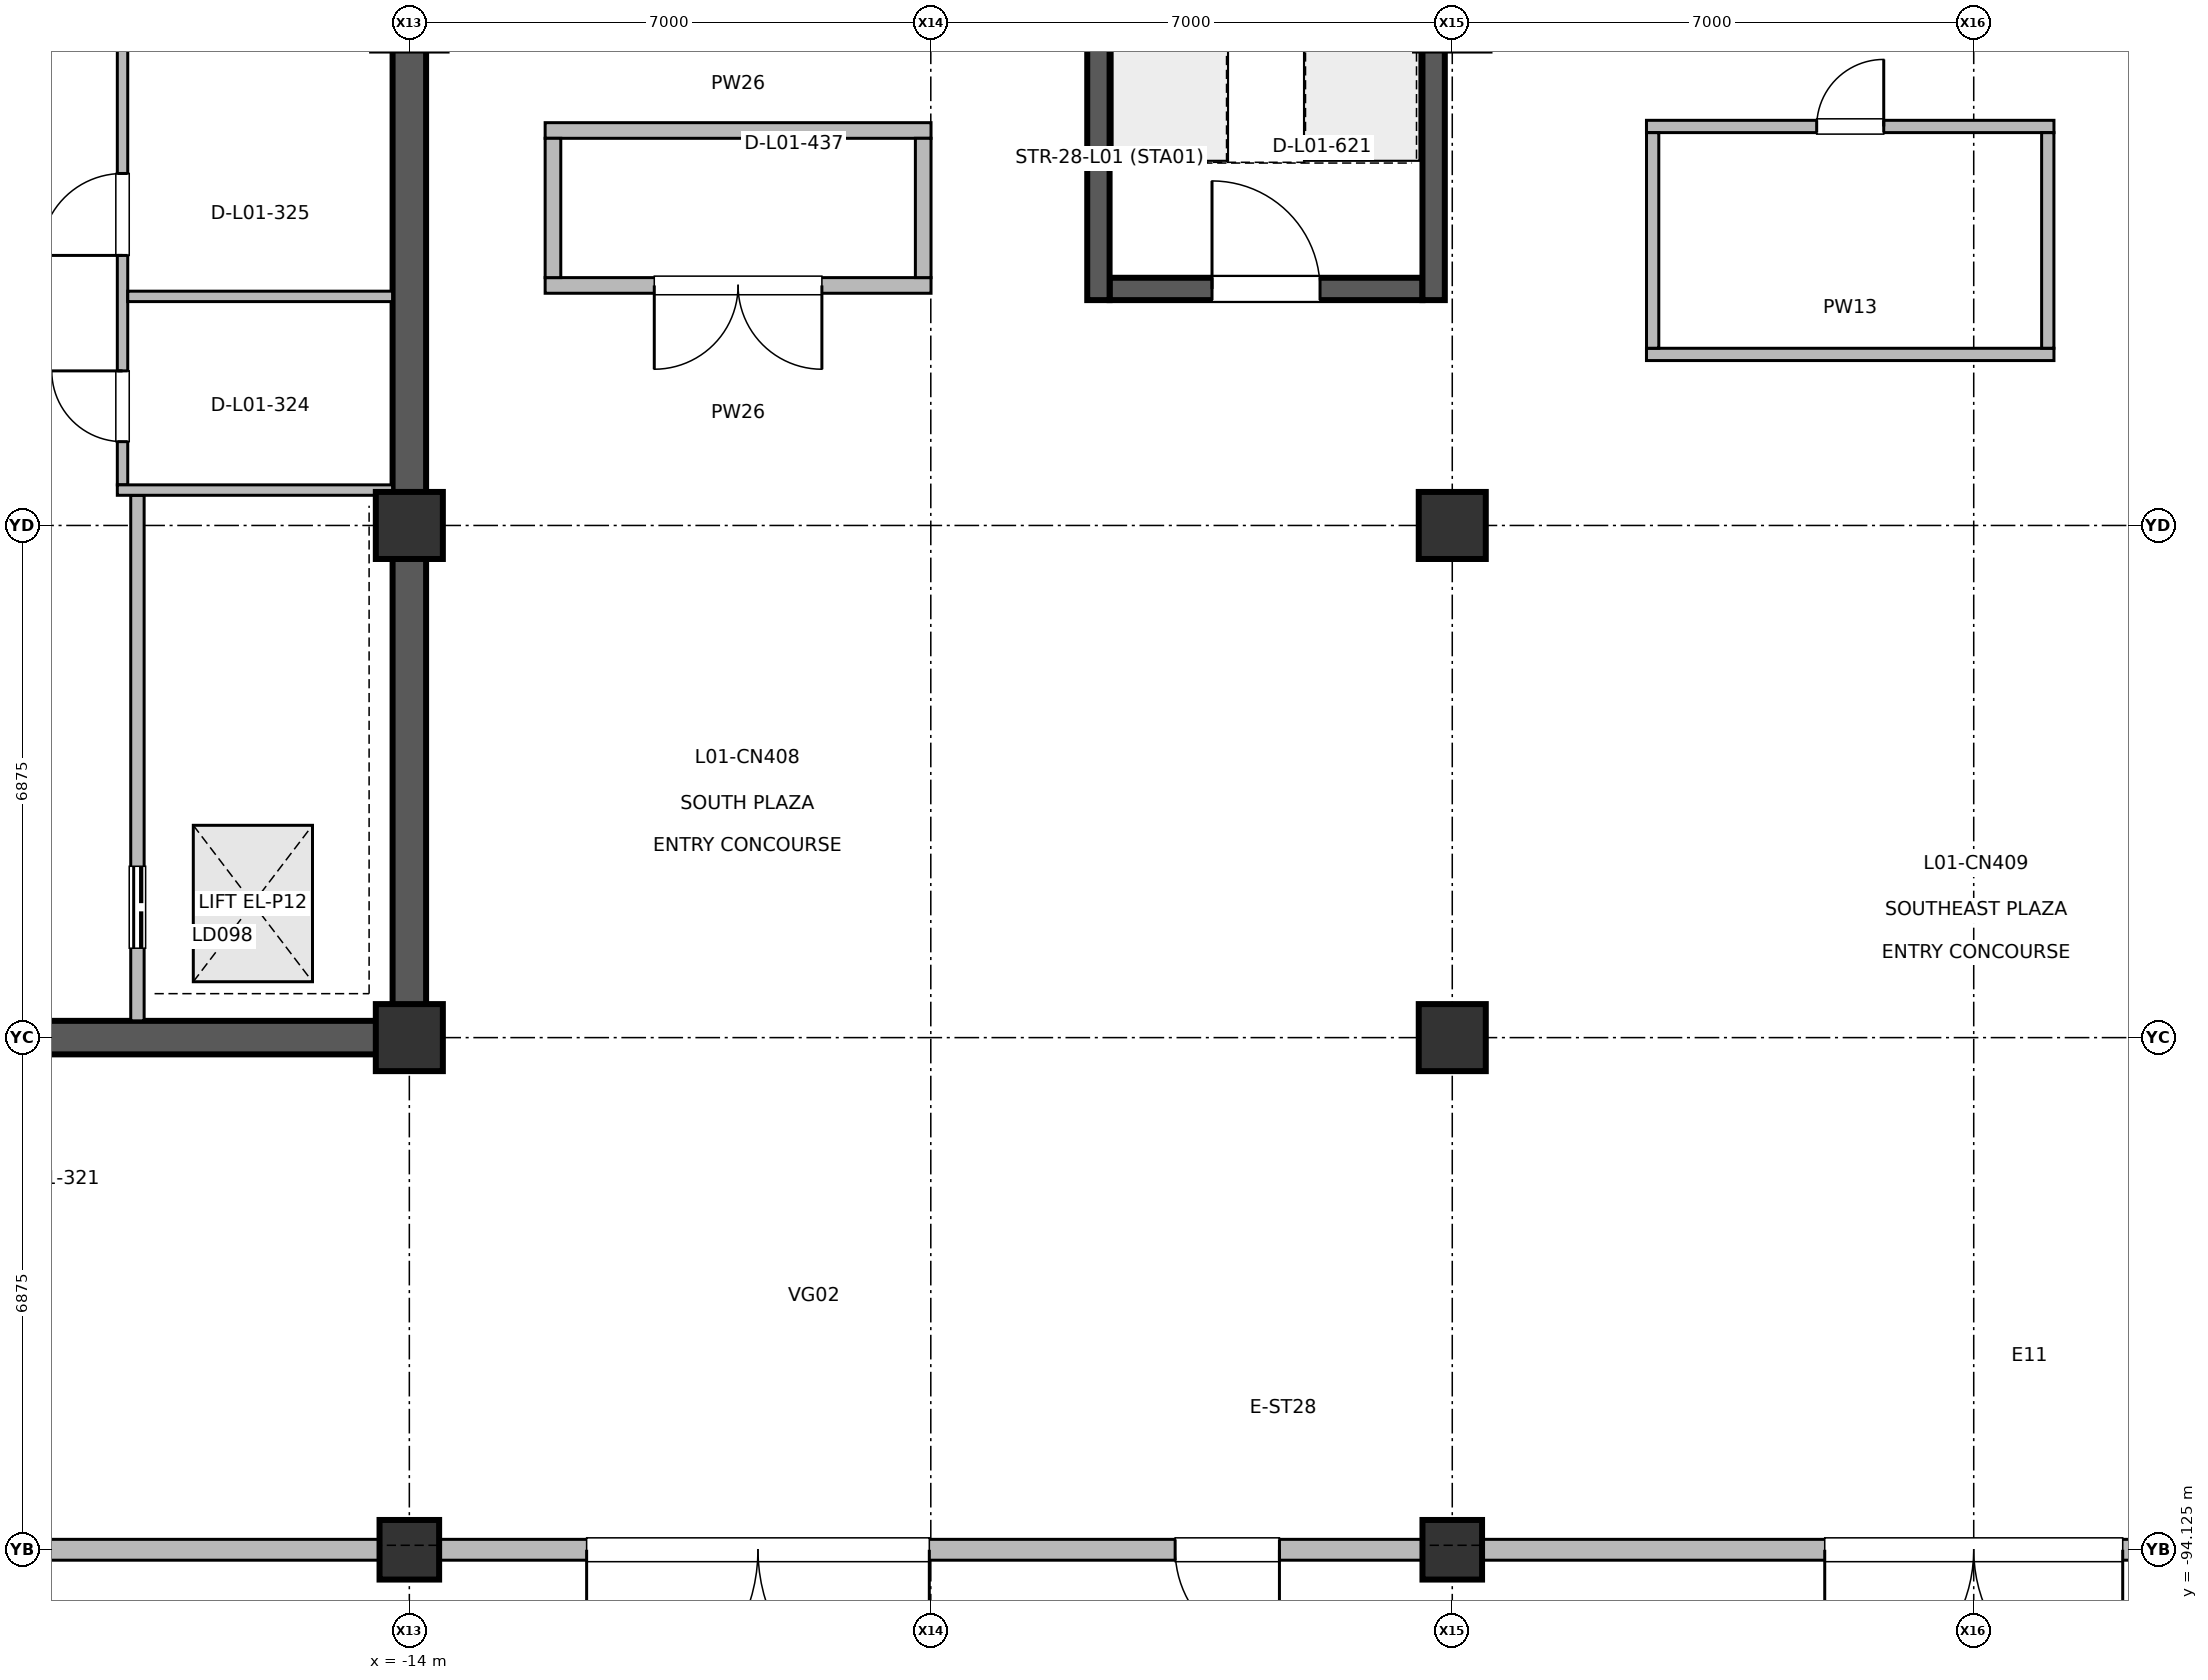
"""IFC4 building model, lengths in metres.
Left out: names, types, materials, properties, quantities, classifications, styles, units other than length and angle.
Written with IfcOpenShell. Run it as: python <this file> out.ifc"""

import sys

from ifc_helpers import new_model, si_unit, direction, frame, frame_2d, origin, origin_2d, place, context, subcontext, project, spatial, rectangle, circle, extrude, element, fill, save


model = new_model("IFC4")
c1 = context("Model", 3, precision=1e-05, world=origin(), true_north=direction((0.0, 1.0)))
c2 = subcontext(c1, "Body", "Model", "MODEL_VIEW")
j1 = project(units=[si_unit("LENGTHUNIT", "METRE"), si_unit("PLANEANGLEUNIT", "RADIAN")], contexts=[c1])
p1 = place(None, origin())
s1 = spatial("IfcSite", under=j1, at=p1, CompositionType="ELEMENT")
p2 = place(p1, origin())
s2 = spatial("IfcBuilding", under=s1, at=p2, CompositionType="ELEMENT")
p3 = place(p2, origin())
s3 = spatial("IfcBuildingStorey", under=s2, at=p3, CompositionType="ELEMENT", Elevation=0.0)
p4 = place(p3, frame((-14.0, -94.125, 0.0), z_axis=(0.0, 0.0, 1.0), x_axis=(1.0, 0.0, 0.0)))
e1 = element("IfcColumn", 1, at=p4, inside=s3, PredefinedType="COLUMN", context=c2, shape_type="SweptSolid", body=[
    extrude(circle(Radius=0.4, at=origin_2d()), origin(), (0.0, 0.0, 1.0), 5.998),
])
for number, where, z_axis, x_axis in (
    (2, (-14.0, -87.25, 0.0), (0.0, 0.0, 1.0), (1.0, 0.0, 0.0)),
    (3, (-14.0, -80.375, 0.0), (0.0, 0.0, 1.0), (1.0, 0.0, 0.0)),
):
    element("IfcColumn", number, at=place(p3, frame(where, z_axis=z_axis, x_axis=x_axis)), inside=s3, PredefinedType="COLUMN", context=c2, shape_type="SweptSolid", body=[
        extrude(rectangle(XDim=0.9, YDim=0.9, at=origin_2d()), origin(), (0.0, 0.0, 1.0), 5.998),
    ])
p5 = place(p3, frame((0.0, -94.125, 0.0), z_axis=(0.0, 0.0, 1.0), x_axis=(1.0, 0.0, 0.0)))
e4 = element("IfcColumn", 4, at=p5, inside=s3, PredefinedType="COLUMN", context=c2, shape_type="SweptSolid", body=[
    extrude(circle(Radius=0.4, at=origin_2d()), origin(), (0.0, 0.0, 1.0), 5.998),
])
for number, where, z_axis, x_axis in (
    (5, (0.0, -87.25, 0.0), (0.0, 0.0, 1.0), (1.0, 0.0, 0.0)),
    (6, (0.0, -80.375, 0.0), (0.0, 0.0, 1.0), (1.0, 0.0, 0.0)),
):
    element("IfcColumn", number, at=place(p3, frame(where, z_axis=z_axis, x_axis=x_axis)), inside=s3, PredefinedType="COLUMN", context=c2, shape_type="SweptSolid", body=[
        extrude(rectangle(XDim=0.9, YDim=0.9, at=origin_2d()), origin(), (0.0, 0.0, 1.0), 5.998),
    ])
p6 = place(p3, frame((-14.0, -87.025, 0.0), z_axis=(0.0, 0.0, 1.0), x_axis=(0.0, 1.0, 0.0)))
e7 = element("IfcWall", 7, at=p6, inside=s3, PredefinedType="SHEAR", context=c2, shape_type="SweptSolid", body=[
    extrude(rectangle(XDim=13.3, YDim=0.45, at=frame_2d((6.65, 0.0))), origin(), (0.0, 0.0, 1.0), 5.78),
])
p7 = place(p3, frame((-27.775, -87.25, 0.0), z_axis=(0.0, 0.0, 1.0), x_axis=(1.0, 0.0, 0.0)))
e8 = element("IfcWall", 8, at=p7, inside=s3, PredefinedType="SHEAR", context=c2, shape_type="SweptSolid", body=[
    extrude(rectangle(XDim=13.55, YDim=0.45, at=frame_2d((6.775, 0.0))), origin(), (0.0, 0.0, 1.0), 5.78),
])
p8 = place(p7, frame((7.452, 0.0, 0.0)))
e9 = element("IfcOpeningElement", 9, at=p8, cuts=e8, PredefinedType="OPENING", context=c2, shape_type="SweptSolid", body=[
    extrude(rectangle(XDim=1.5, YDim=2.2, at=frame_2d((0.75, 1.1))), frame((0.0, 0.235, 0.0), z_axis=(0.0, -1.0, 0.0), x_axis=(1.0, 0.0, 0.0)), (0.0, 0.0, 1.0), 0.47),
])
p9 = place(p3, frame((-14.38, -94.125, 0.0), z_axis=(0.0, 0.0, 1.0), x_axis=(-1.0, 0.0, 0.0)))
e10 = element("IfcWall", 10, at=p9, inside=s3, PredefinedType="SOLIDWALL", context=c2, shape_type="SweptSolid", body=[
    extrude(rectangle(XDim=13.24, YDim=0.28, at=frame_2d((6.62, 0.0))), origin(), (0.0, 0.0, 1.0), 4.555),
])
p10 = place(p9, frame((5.02, 0.0, 0.0)))
e11 = element("IfcOpeningElement", 11, at=p10, cuts=e10, PredefinedType="OPENING", context=c2, shape_type="SweptSolid", body=[
    extrude(rectangle(XDim=3.2, YDim=2.7, at=frame_2d((1.6, 1.35))), frame((0.0, 0.15, 0.0), z_axis=(0.0, -1.0, 0.0), x_axis=(1.0, 0.0, 0.0)), (0.0, 0.0, 1.0), 0.3),
])
p11 = place(p3, frame((-0.38, -94.125, 0.0), z_axis=(0.0, 0.0, 1.0), x_axis=(-1.0, 0.0, 0.0)))
e12 = element("IfcWall", 12, at=p11, inside=s3, PredefinedType="SOLIDWALL", context=c2, shape_type="SweptSolid", body=[
    extrude(rectangle(XDim=13.24, YDim=0.28, at=frame_2d((6.62, 0.0))), origin(), (0.0, 0.0, 1.0), 4.555),
])
p12 = place(p11, frame((6.64, 0.0, 0.0)))
e13 = element("IfcOpeningElement", 13, at=p12, cuts=e12, PredefinedType="OPENING", context=c2, shape_type="SweptSolid", body=[
    extrude(rectangle(XDim=4.6, YDim=3.7, at=frame_2d((2.3, 1.85))), frame((0.0, 0.15, 0.0), z_axis=(0.0, -1.0, 0.0), x_axis=(1.0, 0.0, 0.0)), (0.0, 0.0, 1.0), 0.3),
])
p13 = place(p11, frame((1.94, 0.0, 0.0)))
e14 = element("IfcOpeningElement", 14, at=p13, cuts=e12, PredefinedType="OPENING", context=c2, shape_type="SweptSolid", body=[
    extrude(rectangle(XDim=1.4, YDim=2.2, at=frame_2d((0.7, 1.1))), frame((0.0, 0.15, 0.0), z_axis=(0.0, -1.0, 0.0), x_axis=(1.0, 0.0, 0.0)), (0.0, 0.0, 1.0), 0.3),
])
p14 = place(p3, frame((13.62, -94.125, 0.0), z_axis=(0.0, 0.0, 1.0), x_axis=(-1.0, 0.0, 0.0)))
e15 = element("IfcWall", 15, at=p14, inside=s3, PredefinedType="SOLIDWALL", context=c2, shape_type="SweptSolid", body=[
    extrude(rectangle(XDim=13.24, YDim=0.28, at=frame_2d((6.62, 0.0))), origin(), (0.0, 0.0, 1.0), 4.555),
])
p15 = place(p14, frame((4.62, 0.0, 0.0)))
e16 = element("IfcOpeningElement", 16, at=p15, cuts=e15, PredefinedType="OPENING", context=c2, shape_type="SweptSolid", body=[
    extrude(rectangle(XDim=4.0, YDim=2.8, at=frame_2d((2.0, 1.4))), frame((0.0, 0.15, 0.0), z_axis=(0.0, -1.0, 0.0), x_axis=(1.0, 0.0, 0.0)), (0.0, 0.0, 1.0), 0.3),
])
p16 = place(p3, frame((-17.65, -87.025, 0.0), z_axis=(0.0, 0.0, 1.0), x_axis=(0.0, 1.0, 0.0)))
e17 = element("IfcWall", 17, at=p16, inside=s3, PredefinedType="PARTITIONING", context=c2, shape_type="SweptSolid", body=[
    extrude(rectangle(XDim=7.055, YDim=0.18, at=frame_2d((3.527, 0.0))), origin(), (0.0, 0.0, 1.0), 5.02),
])
p17 = place(p16, frame((0.975, 0.0, 0.0)))
e18 = element("IfcOpeningElement", 18, at=p17, cuts=e17, PredefinedType="OPENING", context=c2, shape_type="SweptSolid", body=[
    extrude(rectangle(XDim=1.1, YDim=2.2, at=frame_2d((0.55, 1.1))), frame((0.0, 0.1, 0.0), z_axis=(0.0, -1.0, 0.0), x_axis=(1.0, 0.0, 0.0)), (0.0, 0.0, 1.0), 0.2),
])
p18 = place(p3, frame((-17.85, -79.83, 0.0), z_axis=(0.0, 0.0, 1.0), x_axis=(0.0, 1.0, 0.0)))
e19 = element("IfcWall", 19, at=p18, inside=s3, PredefinedType="PARTITIONING", context=c2, shape_type="SweptSolid", body=[
    extrude(rectangle(XDim=6.105, YDim=0.14, at=frame_2d((3.052, 0.0))), origin(), (0.0, 0.0, 1.0), 5.02),
])
p19 = place(p18, frame((0.58, 0.0, 0.0)))
e20 = element("IfcOpeningElement", 20, at=p19, cuts=e19, PredefinedType="OPENING", context=c2, shape_type="SweptSolid", body=[
    extrude(rectangle(XDim=0.95, YDim=2.15, at=frame_2d((0.475, 1.075))), frame((0.0, 0.08, 0.0), z_axis=(0.0, -1.0, 0.0), x_axis=(1.0, 0.0, 0.0)), (0.0, 0.0, 1.0), 0.16),
])
p20 = place(p18, frame((3.08, 0.0, 0.0)))
e21 = element("IfcOpeningElement", 21, at=p20, cuts=e19, PredefinedType="OPENING", context=c2, shape_type="SweptSolid", body=[
    extrude(rectangle(XDim=1.1, YDim=2.15, at=frame_2d((0.55, 1.075))), frame((0.0, 0.08, 0.0), z_axis=(0.0, -1.0, 0.0), x_axis=(1.0, 0.0, 0.0)), (0.0, 0.0, 1.0), 0.16),
])
p21 = place(p3, frame((-6.997, -77.153, 0.0), z_axis=(0.0, 0.0, 1.0), x_axis=(-1.0, 0.0, 0.0)))
e22 = element("IfcWall", 22, at=p21, inside=s3, PredefinedType="PARTITIONING", context=c2, shape_type="SweptSolid", body=[
    extrude(rectangle(XDim=5.18, YDim=0.21, at=frame_2d((2.59, 0.0))), origin(), (0.0, 0.0, 1.0), 5.02),
])
p22 = place(p21, frame((1.465, 0.0, 0.0)))
e23 = element("IfcOpeningElement", 23, at=p22, cuts=e22, PredefinedType="OPENING", context=c2, shape_type="SweptSolid", body=[
    extrude(rectangle(XDim=2.25, YDim=2.45, at=frame_2d((1.125, 1.225))), frame((0.0, 0.115, 0.0), z_axis=(0.0, -1.0, 0.0), x_axis=(1.0, 0.0, 0.0)), (0.0, 0.0, 1.0), 0.23),
])
p23 = place(p3, frame((2.607, -75.019, 0.0), z_axis=(0.0, 0.0, 1.0), x_axis=(1.0, 0.0, 0.0)))
e24 = element("IfcWall", 24, at=p23, inside=s3, PredefinedType="PARTITIONING", context=c2, shape_type="SweptSolid", body=[
    extrude(rectangle(XDim=5.47, YDim=0.165, at=frame_2d((2.735, 0.0))), origin(), (0.0, 0.0, 1.0), 5.02),
])
p24 = place(p23, frame((2.285, 0.0, 0.0)))
e25 = element("IfcOpeningElement", 25, at=p24, cuts=e24, PredefinedType="OPENING", context=c2, shape_type="SweptSolid", body=[
    extrude(rectangle(XDim=0.9, YDim=2.15, at=frame_2d((0.45, 1.075))), frame((0.0, 0.093, 0.0), z_axis=(0.0, -1.0, 0.0), x_axis=(1.0, 0.0, 0.0)), (0.0, 0.0, 1.0), 0.185),
])
p25 = place(p3, frame((-17.92, -79.9, 0.0), z_axis=(0.0, 0.0, 1.0), x_axis=(1.0, 0.0, 0.0)))
e26 = element("IfcWall", 26, at=p25, inside=s3, PredefinedType="PARTITIONING", context=c2, shape_type="SweptSolid", body=[
    extrude(rectangle(XDim=3.695, YDim=0.14, at=frame_2d((1.847, 0.0))), origin(), (0.0, 0.0, 1.0), 5.02),
])
p26 = place(p3, frame((-17.78, -77.3, 0.0), z_axis=(0.0, 0.0, 1.0), x_axis=(1.0, 0.0, 0.0)))
e27 = element("IfcWall", 27, at=p26, inside=s3, PredefinedType="PARTITIONING", context=c2, shape_type="SweptSolid", body=[
    extrude(rectangle(XDim=3.555, YDim=0.14, at=frame_2d((1.777, 0.0))), origin(), (0.0, 0.0, 1.0), 5.02),
])
p27 = place(p3, frame((-12.177, -75.073, 0.0), z_axis=(0.0, 0.0, 1.0), x_axis=(1.0, 0.0, 0.0)))
e28 = element("IfcWall", 28, at=p27, inside=s3, PredefinedType="PARTITIONING", context=c2, shape_type="SweptSolid", body=[
    extrude(rectangle(XDim=5.18, YDim=0.21, at=frame_2d((2.59, 0.0))), origin(), (0.0, 0.0, 1.0), 5.02),
])
for number, where, z_axis, x_axis in (
    (29, (-12.072, -77.048, 0.0), (0.0, 0.0, 1.0), (0.0, 1.0, 0.0)),
    (30, (-7.102, -77.048, 0.0), (0.0, 0.0, 1.0), (0.0, 1.0, 0.0)),
):
    element("IfcWall", number, at=place(p3, frame(where, z_axis=z_axis, x_axis=x_axis)), inside=s3, PredefinedType="PARTITIONING", context=c2, shape_type="SweptSolid", body=[
        extrude(rectangle(XDim=1.87, YDim=0.21, at=frame_2d((0.935, 0.0))), origin(), (0.0, 0.0, 1.0), 5.02),
    ])
p28 = place(p3, frame((2.607, -78.079, 0.0), z_axis=(0.0, 0.0, 1.0), x_axis=(1.0, 0.0, 0.0)))
e31 = element("IfcWall", 31, at=p28, inside=s3, PredefinedType="PARTITIONING", context=c2, shape_type="SweptSolid", body=[
    extrude(rectangle(XDim=5.47, YDim=0.165, at=frame_2d((2.735, 0.0))), origin(), (0.0, 0.0, 1.0), 5.02),
])
for number, where, z_axis, x_axis in (
    (32, (2.69, -77.996, 0.0), (0.0, 0.0, 1.0), (0.0, 1.0, 0.0)),
    (33, (7.994, -77.996, 0.0), (0.0, 0.0, 1.0), (0.0, 1.0, 0.0)),
):
    element("IfcWall", number, at=place(p3, frame(where, z_axis=z_axis, x_axis=x_axis)), inside=s3, PredefinedType="PARTITIONING", context=c2, shape_type="SweptSolid", body=[
        extrude(rectangle(XDim=2.894, YDim=0.165, at=frame_2d((1.447, 0.0))), origin(), (0.0, 0.0, 1.0), 5.02),
    ])
p29 = place(p3, frame((-4.6, -77.2, 0.0), z_axis=(0.0, 0.0, 1.0), x_axis=(1.0, 0.0, 0.0)))
e34 = element("IfcWall", 34, at=p29, inside=s3, PredefinedType="SHEAR", context=c2, shape_type="SweptSolid", body=[
    extrude(rectangle(XDim=4.2, YDim=0.3, at=frame_2d((2.1, 0.0))), origin(), (0.0, 0.0, 1.0), 5.78),
])
p30 = place(p29, frame((1.375, 0.0, 0.0)))
e35 = element("IfcOpeningElement", 35, at=p30, cuts=e34, PredefinedType="OPENING", context=c2, shape_type="SweptSolid", body=[
    extrude(rectangle(XDim=1.45, YDim=2.2, at=frame_2d((0.725, 1.1))), frame((0.0, 0.16, 0.0), z_axis=(0.0, -1.0, 0.0), x_axis=(1.0, 0.0, 0.0)), (0.0, 0.0, 1.0), 0.32),
])
for number, where, z_axis, x_axis in (
    (36, (-4.75, -77.35, 0.0), (0.0, 0.0, 1.0), (0.0, 1.0, 0.0)),
    (37, (-0.25, -77.35, 0.0), (0.0, 0.0, 1.0), (0.0, 1.0, 0.0)),
):
    element("IfcWall", number, at=place(p3, frame(where, z_axis=z_axis, x_axis=x_axis)), inside=s3, PredefinedType="SHEAR", context=c2, shape_type="SweptSolid", body=[
        extrude(rectangle(XDim=8.45, YDim=0.3, at=frame_2d((4.225, 0.0))), origin(), (0.0, 0.0, 1.0), 5.78),
    ])
p31 = place(p12, origin())
e38 = element("IfcDoor", 38, at=p31, inside=s3, OperationType="DOUBLE_DOOR_SINGLE_SWING", PredefinedType="DOOR", context=c2, shape_type="SweptSolid", body=[
    extrude(rectangle(XDim=4.6, YDim=3.7, at=frame_2d((2.3, 1.85))), frame((0.0, 0.025, 0.0), z_axis=(0.0, -1.0, 0.0), x_axis=(1.0, 0.0, 0.0)), (0.0, 0.0, 1.0), 0.05),
])
fill(e13, e38)
p32 = place(p13, origin())
e39 = element("IfcDoor", 39, at=p32, inside=s3, OperationType="SINGLE_SWING_LEFT", PredefinedType="DOOR", context=c2, shape_type="SweptSolid", body=[
    extrude(rectangle(XDim=1.4, YDim=2.2, at=frame_2d((0.7, 1.1))), frame((0.0, 0.025, 0.0), z_axis=(0.0, -1.0, 0.0), x_axis=(1.0, 0.0, 0.0)), (0.0, 0.0, 1.0), 0.05),
])
fill(e14, e39)
p33 = place(p15, origin())
e40 = element("IfcDoor", 40, at=p33, inside=s3, OperationType="DOUBLE_DOOR_SINGLE_SWING", PredefinedType="DOOR", context=c2, shape_type="SweptSolid", body=[
    extrude(rectangle(XDim=4.0, YDim=2.8, at=frame_2d((2.0, 1.4))), frame((0.0, 0.025, 0.0), z_axis=(0.0, -1.0, 0.0), x_axis=(1.0, 0.0, 0.0)), (0.0, 0.0, 1.0), 0.05),
])
fill(e16, e40)
p34 = place(p17, origin())
e41 = element("IfcDoor", 41, at=p34, inside=s3, OperationType="DOUBLE_DOOR_SLIDING", PredefinedType="DOOR", context=c2, shape_type="SweptSolid", body=[
    extrude(rectangle(XDim=1.1, YDim=2.2, at=frame_2d((0.55, 1.1))), frame((0.0, 0.025, 0.0), z_axis=(0.0, -1.0, 0.0), x_axis=(1.0, 0.0, 0.0)), (0.0, 0.0, 1.0), 0.05),
])
fill(e18, e41)
p35 = place(p19, origin())
e42 = element("IfcDoor", 42, at=p35, inside=s3, OperationType="SINGLE_SWING_RIGHT", PredefinedType="DOOR", context=c2, shape_type="SweptSolid", body=[
    extrude(rectangle(XDim=0.95, YDim=2.15, at=frame_2d((0.475, 1.075))), frame((0.0, 0.025, 0.0), z_axis=(0.0, -1.0, 0.0), x_axis=(1.0, 0.0, 0.0)), (0.0, 0.0, 1.0), 0.05),
])
fill(e20, e42)
p36 = place(p20, origin())
e43 = element("IfcDoor", 43, at=p36, inside=s3, OperationType="SINGLE_SWING_LEFT", PredefinedType="DOOR", context=c2, shape_type="SweptSolid", body=[
    extrude(rectangle(XDim=1.1, YDim=2.15, at=frame_2d((0.55, 1.075))), frame((0.0, 0.025, 0.0), z_axis=(0.0, -1.0, 0.0), x_axis=(1.0, 0.0, 0.0)), (0.0, 0.0, 1.0), 0.05),
])
fill(e21, e43)
p37 = place(p22, origin())
e44 = element("IfcDoor", 44, at=p37, inside=s3, OperationType="DOUBLE_DOOR_SINGLE_SWING", PredefinedType="DOOR", context=c2, shape_type="SweptSolid", body=[
    extrude(rectangle(XDim=2.25, YDim=2.45, at=frame_2d((1.125, 1.225))), frame((0.0, 0.025, 0.0), z_axis=(0.0, -1.0, 0.0), x_axis=(1.0, 0.0, 0.0)), (0.0, 0.0, 1.0), 0.05),
])
fill(e23, e44)
p38 = place(p24, origin())
e45 = element("IfcDoor", 45, at=p38, inside=s3, OperationType="SINGLE_SWING_RIGHT", PredefinedType="DOOR", context=c2, shape_type="SweptSolid", body=[
    extrude(rectangle(XDim=0.9, YDim=2.15, at=frame_2d((0.45, 1.075))), frame((0.0, 0.025, 0.0), z_axis=(0.0, -1.0, 0.0), x_axis=(1.0, 0.0, 0.0)), (0.0, 0.0, 1.0), 0.05),
])
fill(e25, e45)
p39 = place(p30, origin())
e46 = element("IfcDoor", 46, at=p39, inside=s3, OperationType="SINGLE_SWING_LEFT", PredefinedType="DOOR", context=c2, shape_type="SweptSolid", body=[
    extrude(rectangle(XDim=1.45, YDim=2.2, at=frame_2d((0.725, 1.1))), frame((0.0, 0.025, 0.0), z_axis=(0.0, -1.0, 0.0), x_axis=(1.0, 0.0, 0.0)), (0.0, 0.0, 1.0), 0.05),
])
fill(e35, e46)
save(model, sys.argv[1])
